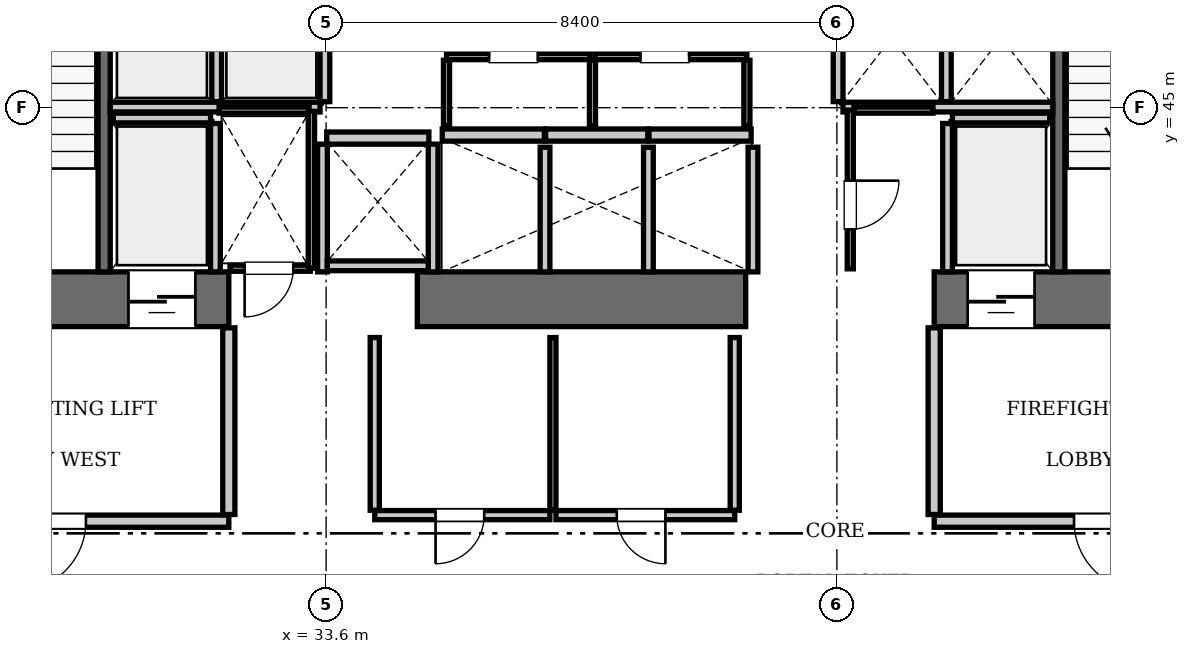
"""IFC4 building model, lengths in metres.
Left out: names, types, materials, properties, quantities, classifications, styles, units other than length and angle.
Written with IfcOpenShell. Run it as: python <this file> out.ifc"""

import sys

from ifc_helpers import new_model, si_unit, direction, frame, frame_2d, origin, place, context, subcontext, project, spatial, rectangle, extrude, element, fill, save


model = new_model("IFC4")
c1 = context("Model", 3, precision=1e-05, world=origin(), true_north=direction((0.0, 1.0)))
c2 = subcontext(c1, "Body", "Model", "MODEL_VIEW")
j1 = project(units=[si_unit("LENGTHUNIT", "METRE"), si_unit("PLANEANGLEUNIT", "RADIAN")], contexts=[c1])
p1 = place(None, origin())
s1 = spatial("IfcSite", under=j1, at=p1, CompositionType="ELEMENT")
p2 = place(p1, origin())
s2 = spatial("IfcBuilding", under=s1, at=p2, CompositionType="ELEMENT")
p3 = place(p2, frame((0.0, 0.0, 61.6)))
s3 = spatial("IfcBuildingStorey", under=s2, at=p3, CompositionType="ELEMENT", Elevation=61.6)
p4 = place(p3, frame((25.2, 41.85, 0.0), z_axis=(0.0, 0.0, 1.0), x_axis=(1.0, 0.0, 0.0)))
e1 = element("IfcWall", 1, at=p4, inside=s3, PredefinedType="SHEAR", context=c2, shape_type="SweptSolid", body=[
    extrude(rectangle(XDim=6.8, YDim=0.9, at=frame_2d((3.4, 0.0))), origin(), (0.0, 0.0, 1.0), 3.85),
])
p5 = place(p4, frame((1.65, 0.0, 0.0)))
e2 = element("IfcOpeningElement", 2, at=p5, cuts=e1, PredefinedType="OPENING", context=c2, shape_type="SweptSolid", body=[
    extrude(rectangle(XDim=1.15, YDim=2.15, at=frame_2d((0.575, 1.075))), frame((0.0, 0.46, 0.0), z_axis=(0.0, -1.0, 0.0), x_axis=(1.0, 0.0, 0.0)), (0.0, 0.0, 1.0), 0.92),
])
p6 = place(p4, frame((5.15, 0.0, 0.0)))
e3 = element("IfcOpeningElement", 3, at=p6, cuts=e1, PredefinedType="OPENING", context=c2, shape_type="SweptSolid", body=[
    extrude(rectangle(XDim=1.1, YDim=2.2, at=frame_2d((0.55, 1.1))), frame((0.0, 0.46, 0.0), z_axis=(0.0, -1.0, 0.0), x_axis=(1.0, 0.0, 0.0)), (0.0, 0.0, 1.0), 0.92),
])
p7 = place(p3, frame((35.1, 41.85, 0.0), z_axis=(0.0, 0.0, 1.0), x_axis=(1.0, 0.0, 0.0)))
e4 = element("IfcWall", 4, at=p7, inside=s3, PredefinedType="SHEAR", context=c2, shape_type="SweptSolid", body=[
    extrude(rectangle(XDim=5.4, YDim=0.9, at=frame_2d((2.7, 0.0))), origin(), (0.0, 0.0, 1.0), 3.85),
])
p8 = place(p3, frame((43.6, 41.85, 0.0), z_axis=(0.0, 0.0, 1.0), x_axis=(1.0, 0.0, 0.0)))
e5 = element("IfcWall", 5, at=p8, inside=s3, PredefinedType="SHEAR", context=c2, shape_type="SweptSolid", body=[
    extrude(rectangle(XDim=6.8, YDim=0.9, at=frame_2d((3.4, 0.0))), origin(), (0.0, 0.0, 1.0), 3.85),
])
p9 = place(p8, frame((3.9, 0.0, 0.0)))
e6 = element("IfcOpeningElement", 6, at=p9, cuts=e5, PredefinedType="OPENING", context=c2, shape_type="SweptSolid", body=[
    extrude(rectangle(XDim=1.15, YDim=2.15, at=frame_2d((0.575, 1.075))), frame((0.0, 0.46, 0.0), z_axis=(0.0, -1.0, 0.0), x_axis=(1.0, 0.0, 0.0)), (0.0, 0.0, 1.0), 0.92),
])
p10 = place(p8, frame((0.55, 0.0, 0.0)))
e7 = element("IfcOpeningElement", 7, at=p10, cuts=e5, PredefinedType="OPENING", context=c2, shape_type="SweptSolid", body=[
    extrude(rectangle(XDim=1.1, YDim=2.2, at=frame_2d((0.55, 1.1))), frame((0.0, 0.46, 0.0), z_axis=(0.0, -1.0, 0.0), x_axis=(1.0, 0.0, 0.0)), (0.0, 0.0, 1.0), 0.92),
])
for number, where, z_axis, x_axis in (
    (8, (29.95, 42.3, 0.0), (0.0, 0.0, 1.0), (0.0, 1.0, 0.0)),
    (9, (45.65, 42.3, 0.0), (0.0, 0.0, 1.0), (0.0, 1.0, 0.0)),
):
    element("IfcWall", number, at=place(p3, frame(where, z_axis=z_axis, x_axis=x_axis)), inside=s3, PredefinedType="SOLIDWALL", context=c2, shape_type="SweptSolid", body=[
        extrude(rectangle(XDim=8.85, YDim=0.2, at=frame_2d((4.425, 0.0))), origin(), (0.0, 0.0, 1.0), 3.61),
    ])
for number, where, z_axis, x_axis in (
    (10, (35.51, 44.55, 0.0), (0.0, 0.0, 1.0), (1.0, 0.0, 0.0)),
    (11, (37.21, 44.55, 0.0), (0.0, 0.0, 1.0), (1.0, 0.0, 0.0)),
):
    element("IfcWall", number, at=place(p3, frame(where, z_axis=z_axis, x_axis=x_axis)), inside=s3, PredefinedType="SOLIDWALL", context=c2, shape_type="SweptSolid", body=[
        extrude(rectangle(XDim=1.68, YDim=0.2, at=frame_2d((0.84, 0.0))), origin(), (0.0, 0.0, 1.0), 3.61),
    ])
p11 = place(p3, frame((38.91, 44.55, 0.0), z_axis=(0.0, 0.0, 1.0), x_axis=(1.0, 0.0, 0.0)))
e12 = element("IfcWall", 12, at=p11, inside=s3, PredefinedType="SOLIDWALL", context=c2, shape_type="SweptSolid", body=[
    extrude(rectangle(XDim=1.68, YDim=0.2, at=frame_2d((0.84, 0.0))), origin(), (0.0, 0.0, 1.0), 3.61),
])
p12 = place(p3, frame((33.61, 44.5, 0.0), z_axis=(0.0, 0.0, 1.0), x_axis=(1.0, 0.0, 0.0)))
e13 = element("IfcWall", 13, at=p12, inside=s3, PredefinedType="SOLIDWALL", context=c2, shape_type="SweptSolid", body=[
    extrude(rectangle(XDim=1.68, YDim=0.2, at=frame_2d((0.84, 0.0))), origin(), (0.0, 0.0, 1.0), 3.61),
])
p13 = place(p3, frame((30.1, 44.83, 0.0), z_axis=(0.0, 0.0, 1.0), x_axis=(1.0, 0.0, 0.0)))
e14 = element("IfcWall", 14, at=p13, inside=s3, PredefinedType="SOLIDWALL", context=c2, shape_type="SweptSolid", body=[
    extrude(rectangle(XDim=1.6, YDim=0.16, at=frame_2d((0.8, 0.0))), origin(), (0.0, 0.0, 1.0), 3.61),
])
p14 = place(p3, frame((31.78, 42.3, 0.0), z_axis=(0.0, 0.0, 1.0), x_axis=(0.0, 1.0, 0.0)))
e15 = element("IfcWall", 15, at=p14, inside=s3, PredefinedType="SOLIDWALL", context=c2, shape_type="SweptSolid", body=[
    extrude(rectangle(XDim=2.44, YDim=0.16, at=frame_2d((1.22, 0.0))), origin(), (0.0, 0.0, 1.0), 3.61),
])
p15 = place(p3, frame((43.9, 44.83, 0.0), z_axis=(0.0, 0.0, 1.0), x_axis=(1.0, 0.0, 0.0)))
e16 = element("IfcWall", 16, at=p15, inside=s3, PredefinedType="SOLIDWALL", context=c2, shape_type="SweptSolid", body=[
    extrude(rectangle(XDim=1.6, YDim=0.16, at=frame_2d((0.8, 0.0))), origin(), (0.0, 0.0, 1.0), 3.61),
])
p16 = place(p3, frame((43.82, 42.3, 0.0), z_axis=(0.0, 0.0, 1.0), x_axis=(0.0, 1.0, 0.0)))
e17 = element("IfcWall", 17, at=p16, inside=s3, PredefinedType="SOLIDWALL", context=c2, shape_type="SweptSolid", body=[
    extrude(rectangle(XDim=2.44, YDim=0.16, at=frame_2d((1.22, 0.0))), origin(), (0.0, 0.0, 1.0), 3.61),
])
for number, where, z_axis, x_axis in (
    (18, (31.8, 45.1, 0.0), (0.0, 0.0, 1.0), (0.0, 1.0, 0.0)),
    (19, (33.58, 45.1, 0.0), (0.0, 0.0, 1.0), (0.0, 1.0, 0.0)),
):
    element("IfcWall", number, at=place(p3, frame(where, z_axis=z_axis, x_axis=x_axis)), inside=s3, PredefinedType="SOLIDWALL", context=c2, shape_type="SweptSolid", body=[
        extrude(rectangle(XDim=1.95, YDim=0.16, at=frame_2d((0.975, 0.0))), origin(), (0.0, 0.0, 1.0), 3.61),
    ])
p17 = place(p3, frame((30.05, 45.01, 0.0), z_axis=(0.0, 0.0, 1.0), x_axis=(1.0, 0.0, 0.0)))
e20 = element("IfcWall", 20, at=p17, inside=s3, PredefinedType="SOLIDWALL", context=c2, shape_type="SweptSolid", body=[
    extrude(rectangle(XDim=3.45, YDim=0.16, at=frame_2d((1.725, 0.0))), origin(), (0.0, 0.0, 1.0), 3.61),
])
for number, where, z_axis, x_axis in (
    (21, (42.02, 45.1, 0.0), (0.0, 0.0, 1.0), (0.0, 1.0, 0.0)),
    (22, (43.8, 45.1, 0.0), (0.0, 0.0, 1.0), (0.0, 1.0, 0.0)),
):
    element("IfcWall", number, at=place(p3, frame(where, z_axis=z_axis, x_axis=x_axis)), inside=s3, PredefinedType="SOLIDWALL", context=c2, shape_type="SweptSolid", body=[
        extrude(rectangle(XDim=1.95, YDim=0.16, at=frame_2d((0.975, 0.0))), origin(), (0.0, 0.0, 1.0), 3.61),
    ])
p18 = place(p3, frame((42.1, 45.01, 0.0), z_axis=(0.0, 0.0, 1.0), x_axis=(1.0, 0.0, 0.0)))
e23 = element("IfcWall", 23, at=p18, inside=s3, PredefinedType="SOLIDWALL", context=c2, shape_type="SweptSolid", body=[
    extrude(rectangle(XDim=3.45, YDim=0.16, at=frame_2d((1.725, 0.0))), origin(), (0.0, 0.0, 1.0), 3.61),
])
for number, where, z_axis, x_axis in (
    (24, (37.2, 42.3, 0.0), (0.0, 0.0, 1.0), (0.0, 1.0, 0.0)),
    (25, (38.9, 42.3, 0.0), (0.0, 0.0, 1.0), (0.0, 1.0, 0.0)),
    (26, (40.62, 42.3, 0.0), (0.0, 0.0, 1.0), (0.0, 1.0, 0.0)),
):
    element("IfcWall", number, at=place(p3, frame(where, z_axis=z_axis, x_axis=x_axis)), inside=s3, PredefinedType="SOLIDWALL", context=c2, shape_type="SweptSolid", body=[
        extrude(rectangle(XDim=2.05, YDim=0.16, at=frame_2d((1.025, 0.0))), origin(), (0.0, 0.0, 1.0), 3.61),
    ])
for number, where, z_axis, x_axis in (
    (27, (33.54, 42.3, 0.0), (0.0, 0.0, 1.0), (0.0, 1.0, 0.0)),
    (28, (35.36, 42.3, 0.0), (0.0, 0.0, 1.0), (0.0, 1.0, 0.0)),
):
    element("IfcWall", number, at=place(p3, frame(where, z_axis=z_axis, x_axis=x_axis)), inside=s3, PredefinedType="SOLIDWALL", context=c2, shape_type="SweptSolid", body=[
        extrude(rectangle(XDim=2.1, YDim=0.16, at=frame_2d((1.05, 0.0))), origin(), (0.0, 0.0, 1.0), 3.61),
    ])
p19 = place(p3, frame((33.62, 42.4, 0.0), z_axis=(0.0, 0.0, 1.0), x_axis=(1.0, 0.0, 0.0)))
e29 = element("IfcWall", 29, at=p19, inside=s3, PredefinedType="SOLIDWALL", context=c2, shape_type="SweptSolid", body=[
    extrude(rectangle(XDim=1.66, YDim=0.16, at=frame_2d((0.83, 0.0))), origin(), (0.0, 0.0, 1.0), 3.61),
])
p20 = place(p3, frame((26.2, 38.2, 0.0), z_axis=(0.0, 0.0, 1.0), x_axis=(1.0, 0.0, 0.0)))
e30 = element("IfcWall", 30, at=p20, inside=s3, PredefinedType="PARTITIONING", context=c2, shape_type="SweptSolid", body=[
    extrude(rectangle(XDim=5.8, YDim=0.2, at=frame_2d((2.9, 0.0))), origin(), (0.0, 0.0, 1.0), 3.61),
])
p21 = place(p20, frame((2.3, 0.0, 0.0)))
e31 = element("IfcOpeningElement", 31, at=p21, cuts=e30, PredefinedType="OPENING", context=c2, shape_type="SweptSolid", body=[
    extrude(rectangle(XDim=1.15, YDim=2.15, at=frame_2d((0.575, 1.075))), frame((0.0, 0.11, 0.0), z_axis=(0.0, -1.0, 0.0), x_axis=(1.0, 0.0, 0.0)), (0.0, 0.0, 1.0), 0.22),
])
p22 = place(p3, frame((32.0, 38.31, 0.0), z_axis=(0.0, 0.0, 1.0), x_axis=(0.0, 1.0, 0.0)))
e32 = element("IfcWall", 32, at=p22, inside=s3, PredefinedType="PARTITIONING", context=c2, shape_type="SweptSolid", body=[
    extrude(rectangle(XDim=3.07, YDim=0.2, at=frame_2d((1.535, 0.0))), origin(), (0.0, 0.0, 1.0), 3.61),
])
p23 = place(p3, frame((43.6, 38.2, 0.0), z_axis=(0.0, 0.0, 1.0), x_axis=(1.0, 0.0, 0.0)))
e33 = element("IfcWall", 33, at=p23, inside=s3, PredefinedType="PARTITIONING", context=c2, shape_type="SweptSolid", body=[
    extrude(rectangle(XDim=5.8, YDim=0.2, at=frame_2d((2.9, 0.0))), origin(), (0.0, 0.0, 1.0), 3.61),
])
p24 = place(p23, frame((2.3, 0.0, 0.0)))
e34 = element("IfcOpeningElement", 34, at=p24, cuts=e33, PredefinedType="OPENING", context=c2, shape_type="SweptSolid", body=[
    extrude(rectangle(XDim=1.15, YDim=2.15, at=frame_2d((0.575, 1.075))), frame((0.0, 0.11, 0.0), z_axis=(0.0, -1.0, 0.0), x_axis=(1.0, 0.0, 0.0)), (0.0, 0.0, 1.0), 0.22),
])
p25 = place(p3, frame((43.6, 38.31, 0.0), z_axis=(0.0, 0.0, 1.0), x_axis=(0.0, 1.0, 0.0)))
e35 = element("IfcWall", 35, at=p25, inside=s3, PredefinedType="PARTITIONING", context=c2, shape_type="SweptSolid", body=[
    extrude(rectangle(XDim=3.07, YDim=0.2, at=frame_2d((1.535, 0.0))), origin(), (0.0, 0.0, 1.0), 3.61),
])
p26 = place(p3, frame((32.02, 42.36, 0.0), z_axis=(0.0, 0.0, 1.0), x_axis=(1.0, 0.0, 0.0)))
e36 = element("IfcWall", 36, at=p26, inside=s3, PredefinedType="PARTITIONING", context=c2, shape_type="SweptSolid", body=[
    extrude(rectangle(XDim=1.32, YDim=0.1, at=frame_2d((0.66, 0.0))), origin(), (0.0, 0.0, 1.0), 3.61),
])
p27 = place(p26, frame((0.24, 0.0, 0.0)))
e37 = element("IfcOpeningElement", 37, at=p27, cuts=e36, PredefinedType="OPENING", context=c2, shape_type="SweptSolid", body=[
    extrude(rectangle(XDim=0.8, YDim=2.05, at=frame_2d((0.4, 1.025))), frame((0.0, 0.06, 0.0), z_axis=(0.0, -1.0, 0.0), x_axis=(1.0, 0.0, 0.0)), (0.0, 0.0, 1.0), 0.12),
])
p28 = place(p3, frame((31.84, 44.96, 0.0), z_axis=(0.0, 0.0, 1.0), x_axis=(1.0, 0.0, 0.0)))
e38 = element("IfcWall", 38, at=p28, inside=s3, PredefinedType="PARTITIONING", context=c2, shape_type="SweptSolid", body=[
    extrude(rectangle(XDim=1.48, YDim=0.1, at=frame_2d((0.74, 0.0))), origin(), (0.0, 0.0, 1.0), 3.61),
])
p29 = place(p3, frame((33.36, 42.36, 0.0), z_axis=(0.0, 0.0, 1.0), x_axis=(0.0, 1.0, 0.0)))
e39 = element("IfcWall", 39, at=p29, inside=s3, PredefinedType="PARTITIONING", context=c2, shape_type="SweptSolid", body=[
    extrude(rectangle(XDim=2.58, YDim=0.1, at=frame_2d((1.29, 0.0))), origin(), (0.0, 0.0, 1.0), 3.61),
])
p30 = place(p3, frame((35.58, 45.84, 0.0), z_axis=(0.0, 0.0, 1.0), x_axis=(1.0, 0.0, 0.0)))
e40 = element("IfcWall", 40, at=p30, inside=s3, PredefinedType="PARTITIONING", context=c2, shape_type="SweptSolid", body=[
    extrude(rectangle(XDim=2.36, YDim=0.1, at=frame_2d((1.18, 0.0))), origin(), (0.0, 0.0, 1.0), 3.61),
])
p31 = place(p30, frame((0.7, 0.0, 0.0)))
e41 = element("IfcOpeningElement", 41, at=p31, cuts=e40, PredefinedType="OPENING", context=c2, shape_type="SweptSolid", body=[
    extrude(rectangle(XDim=0.8, YDim=2.05, at=frame_2d((0.4, 1.025))), frame((0.0, 0.06, 0.0), z_axis=(0.0, -1.0, 0.0), x_axis=(1.0, 0.0, 0.0)), (0.0, 0.0, 1.0), 0.12),
])
p32 = place(p3, frame((38.02, 45.84, 0.0), z_axis=(0.0, 0.0, 1.0), x_axis=(1.0, 0.0, 0.0)))
e42 = element("IfcWall", 42, at=p32, inside=s3, PredefinedType="PARTITIONING", context=c2, shape_type="SweptSolid", body=[
    extrude(rectangle(XDim=2.5, YDim=0.1, at=frame_2d((1.25, 0.0))), origin(), (0.0, 0.0, 1.0), 3.61),
])
p33 = place(p32, frame((0.75, 0.0, 0.0)))
e43 = element("IfcOpeningElement", 43, at=p33, cuts=e42, PredefinedType="OPENING", context=c2, shape_type="SweptSolid", body=[
    extrude(rectangle(XDim=0.8, YDim=2.05, at=frame_2d((0.4, 1.025))), frame((0.0, 0.06, 0.0), z_axis=(0.0, -1.0, 0.0), x_axis=(1.0, 0.0, 0.0)), (0.0, 0.0, 1.0), 0.12),
])
for number, where, z_axis, x_axis in (
    (44, (35.58, 44.7, 0.0), (0.0, 0.0, 1.0), (0.0, 1.0, 0.0)),
    (45, (37.98, 44.7, 0.0), (0.0, 0.0, 1.0), (0.0, 1.0, 0.0)),
    (46, (40.52, 44.7, 0.0), (0.0, 0.0, 1.0), (0.0, 1.0, 0.0)),
):
    element("IfcWall", number, at=place(p3, frame(where, z_axis=z_axis, x_axis=x_axis)), inside=s3, PredefinedType="PARTITIONING", context=c2, shape_type="SweptSolid", body=[
        extrude(rectangle(XDim=1.08, YDim=0.1, at=frame_2d((0.54, 0.0))), origin(), (0.0, 0.0, 1.0), 3.61),
    ])
p34 = place(p3, frame((42.22, 42.35, 0.0), z_axis=(0.0, 0.0, 1.0), x_axis=(0.0, 1.0, 0.0)))
e47 = element("IfcWall", 47, at=p34, inside=s3, PredefinedType="PARTITIONING", context=c2, shape_type="SweptSolid", body=[
    extrude(rectangle(XDim=2.61, YDim=0.1, at=frame_2d((1.305, 0.0))), origin(), (0.0, 0.0, 1.0), 3.61),
])
p35 = place(p34, frame((0.65, 0.0, 0.0)))
e48 = element("IfcOpeningElement", 48, at=p35, cuts=e47, PredefinedType="OPENING", context=c2, shape_type="SweptSolid", body=[
    extrude(rectangle(XDim=0.8, YDim=2.05, at=frame_2d((0.4, 1.025))), frame((0.0, 0.06, 0.0), z_axis=(0.0, -1.0, 0.0), x_axis=(1.0, 0.0, 0.0)), (0.0, 0.0, 1.0), 0.12),
])
p36 = place(p3, frame((42.28, 44.96, 0.0), z_axis=(0.0, 0.0, 1.0), x_axis=(1.0, 0.0, 0.0)))
e49 = element("IfcWall", 49, at=p36, inside=s3, PredefinedType="PARTITIONING", context=c2, shape_type="SweptSolid", body=[
    extrude(rectangle(XDim=1.3, YDim=0.1, at=frame_2d((0.65, 0.0))), origin(), (0.0, 0.0, 1.0), 3.61),
])
p37 = place(p3, frame((34.4, 38.3, 0.0), z_axis=(0.0, 0.0, 1.0), x_axis=(1.0, 0.0, 0.0)))
e50 = element("IfcWall", 50, at=p37, inside=s3, PredefinedType="PARTITIONING", context=c2, shape_type="SweptSolid", body=[
    extrude(rectangle(XDim=2.88, YDim=0.15, at=frame_2d((1.44, 0.0))), origin(), (0.0, 0.0, 1.0), 3.61),
])
p38 = place(p37, frame((1.0, 0.0, 0.0)))
e51 = element("IfcOpeningElement", 51, at=p38, cuts=e50, PredefinedType="OPENING", context=c2, shape_type="SweptSolid", body=[
    extrude(rectangle(XDim=0.8, YDim=2.05, at=frame_2d((0.4, 1.025))), frame((0.0, 0.085, 0.0), z_axis=(0.0, -1.0, 0.0), x_axis=(1.0, 0.0, 0.0)), (0.0, 0.0, 1.0), 0.17),
])
p39 = place(p3, frame((37.38, 38.3, 0.0), z_axis=(0.0, 0.0, 1.0), x_axis=(1.0, 0.0, 0.0)))
e52 = element("IfcWall", 52, at=p39, inside=s3, PredefinedType="PARTITIONING", context=c2, shape_type="SweptSolid", body=[
    extrude(rectangle(XDim=2.94, YDim=0.15, at=frame_2d((1.47, 0.0))), origin(), (0.0, 0.0, 1.0), 3.61),
])
p40 = place(p39, frame((1.0, 0.0, 0.0)))
e53 = element("IfcOpeningElement", 53, at=p40, cuts=e52, PredefinedType="OPENING", context=c2, shape_type="SweptSolid", body=[
    extrude(rectangle(XDim=0.8, YDim=2.05, at=frame_2d((0.4, 1.025))), frame((0.0, 0.085, 0.0), z_axis=(0.0, -1.0, 0.0), x_axis=(1.0, 0.0, 0.0)), (0.0, 0.0, 1.0), 0.17),
])
p41 = place(p3, frame((34.4, 38.38, 0.0), z_axis=(0.0, 0.0, 1.0), x_axis=(0.0, 1.0, 0.0)))
e54 = element("IfcWall", 54, at=p41, inside=s3, PredefinedType="PARTITIONING", context=c2, shape_type="SweptSolid", body=[
    extrude(rectangle(XDim=2.84, YDim=0.15, at=frame_2d((1.42, 0.0))), origin(), (0.0, 0.0, 1.0), 3.61),
])
p42 = place(p3, frame((37.33, 38.38, 0.0), z_axis=(0.0, 0.0, 1.0), x_axis=(0.0, 1.0, 0.0)))
e55 = element("IfcWall", 55, at=p42, inside=s3, PredefinedType="PARTITIONING", context=c2, shape_type="SweptSolid", body=[
    extrude(rectangle(XDim=2.84, YDim=0.1, at=frame_2d((1.42, 0.0))), origin(), (0.0, 0.0, 1.0), 3.61),
])
p43 = place(p3, frame((40.32, 38.38, 0.0), z_axis=(0.0, 0.0, 1.0), x_axis=(0.0, 1.0, 0.0)))
e56 = element("IfcWall", 56, at=p43, inside=s3, PredefinedType="PARTITIONING", context=c2, shape_type="SweptSolid", body=[
    extrude(rectangle(XDim=2.84, YDim=0.15, at=frame_2d((1.42, 0.0))), origin(), (0.0, 0.0, 1.0), 3.61),
])
p44 = place(p6, frame((1.1, 0.0, 0.0), z_axis=(0.0, 0.0, 1.0), x_axis=(-1.0, 0.0, 0.0)))
e57 = element("IfcDoor", 57, at=p44, inside=s3, OperationType="SLIDING_TO_LEFT", PredefinedType="DOOR", context=c2, shape_type="SweptSolid", body=[
    extrude(rectangle(XDim=1.1, YDim=2.2, at=frame_2d((0.55, 1.1))), frame((0.0, 0.025, 0.0), z_axis=(0.0, -1.0, 0.0), x_axis=(1.0, 0.0, 0.0)), (0.0, 0.0, 1.0), 0.05),
])
fill(e3, e57)
p45 = place(p10, frame((1.1, 0.0, 0.0), z_axis=(0.0, 0.0, 1.0), x_axis=(-1.0, 0.0, 0.0)))
e58 = element("IfcDoor", 58, at=p45, inside=s3, OperationType="SLIDING_TO_LEFT", PredefinedType="DOOR", context=c2, shape_type="SweptSolid", body=[
    extrude(rectangle(XDim=1.1, YDim=2.2, at=frame_2d((0.55, 1.1))), frame((0.0, 0.025, 0.0), z_axis=(0.0, -1.0, 0.0), x_axis=(1.0, 0.0, 0.0)), (0.0, 0.0, 1.0), 0.05),
])
fill(e7, e58)
p46 = place(p21, frame((1.15, 0.0, 0.0), z_axis=(0.0, 0.0, 1.0), x_axis=(-1.0, 0.0, 0.0)))
e59 = element("IfcDoor", 59, at=p46, inside=s3, OperationType="SINGLE_SWING_RIGHT", PredefinedType="DOOR", context=c2, shape_type="SweptSolid", body=[
    extrude(rectangle(XDim=1.15, YDim=2.15, at=frame_2d((0.575, 1.075))), frame((0.0, 0.025, 0.0), z_axis=(0.0, -1.0, 0.0), x_axis=(1.0, 0.0, 0.0)), (0.0, 0.0, 1.0), 0.05),
])
fill(e31, e59)
p47 = place(p24, frame((1.15, 0.0, 0.0), z_axis=(0.0, 0.0, 1.0), x_axis=(-1.0, 0.0, 0.0)))
e60 = element("IfcDoor", 60, at=p47, inside=s3, OperationType="SINGLE_SWING_LEFT", PredefinedType="DOOR", context=c2, shape_type="SweptSolid", body=[
    extrude(rectangle(XDim=1.15, YDim=2.15, at=frame_2d((0.575, 1.075))), frame((0.0, 0.025, 0.0), z_axis=(0.0, -1.0, 0.0), x_axis=(1.0, 0.0, 0.0)), (0.0, 0.0, 1.0), 0.05),
])
fill(e34, e60)
p48 = place(p27, frame((0.8, 0.0, 0.0), z_axis=(0.0, 0.0, 1.0), x_axis=(-1.0, 0.0, 0.0)))
e61 = element("IfcDoor", 61, at=p48, inside=s3, OperationType="SINGLE_SWING_RIGHT", PredefinedType="DOOR", context=c2, shape_type="SweptSolid", body=[
    extrude(rectangle(XDim=0.8, YDim=2.05, at=frame_2d((0.4, 1.025))), frame((0.0, 0.025, 0.0), z_axis=(0.0, -1.0, 0.0), x_axis=(1.0, 0.0, 0.0)), (0.0, 0.0, 1.0), 0.05),
])
fill(e37, e61)
p49 = place(p31, origin())
e62 = element("IfcDoor", 62, at=p49, inside=s3, OperationType="SINGLE_SWING_LEFT", PredefinedType="DOOR", context=c2, shape_type="SweptSolid", body=[
    extrude(rectangle(XDim=0.8, YDim=2.05, at=frame_2d((0.4, 1.025))), frame((0.0, 0.025, 0.0), z_axis=(0.0, -1.0, 0.0), x_axis=(1.0, 0.0, 0.0)), (0.0, 0.0, 1.0), 0.05),
])
fill(e41, e62)
p50 = place(p33, origin())
e63 = element("IfcDoor", 63, at=p50, inside=s3, OperationType="SINGLE_SWING_RIGHT", PredefinedType="DOOR", context=c2, shape_type="SweptSolid", body=[
    extrude(rectangle(XDim=0.8, YDim=2.05, at=frame_2d((0.4, 1.025))), frame((0.0, 0.025, 0.0), z_axis=(0.0, -1.0, 0.0), x_axis=(1.0, 0.0, 0.0)), (0.0, 0.0, 1.0), 0.05),
])
fill(e43, e63)
p51 = place(p35, frame((0.8, 0.0, 0.0), z_axis=(0.0, 0.0, 1.0), x_axis=(-1.0, 0.0, 0.0)))
e64 = element("IfcDoor", 64, at=p51, inside=s3, OperationType="SINGLE_SWING_LEFT", PredefinedType="DOOR", context=c2, shape_type="SweptSolid", body=[
    extrude(rectangle(XDim=0.8, YDim=2.05, at=frame_2d((0.4, 1.025))), frame((0.0, 0.025, 0.0), z_axis=(0.0, -1.0, 0.0), x_axis=(1.0, 0.0, 0.0)), (0.0, 0.0, 1.0), 0.05),
])
fill(e48, e64)
p52 = place(p38, frame((0.8, 0.0, 0.0), z_axis=(0.0, 0.0, 1.0), x_axis=(-1.0, 0.0, 0.0)))
e65 = element("IfcDoor", 65, at=p52, inside=s3, OperationType="SINGLE_SWING_RIGHT", PredefinedType="DOOR", context=c2, shape_type="SweptSolid", body=[
    extrude(rectangle(XDim=0.8, YDim=2.05, at=frame_2d((0.4, 1.025))), frame((0.0, 0.025, 0.0), z_axis=(0.0, -1.0, 0.0), x_axis=(1.0, 0.0, 0.0)), (0.0, 0.0, 1.0), 0.05),
])
fill(e51, e65)
p53 = place(p40, frame((0.8, 0.0, 0.0), z_axis=(0.0, 0.0, 1.0), x_axis=(-1.0, 0.0, 0.0)))
e66 = element("IfcDoor", 66, at=p53, inside=s3, OperationType="SINGLE_SWING_LEFT", PredefinedType="DOOR", context=c2, shape_type="SweptSolid", body=[
    extrude(rectangle(XDim=0.8, YDim=2.05, at=frame_2d((0.4, 1.025))), frame((0.0, 0.025, 0.0), z_axis=(0.0, -1.0, 0.0), x_axis=(1.0, 0.0, 0.0)), (0.0, 0.0, 1.0), 0.05),
])
fill(e53, e66)
save(model, sys.argv[1])
